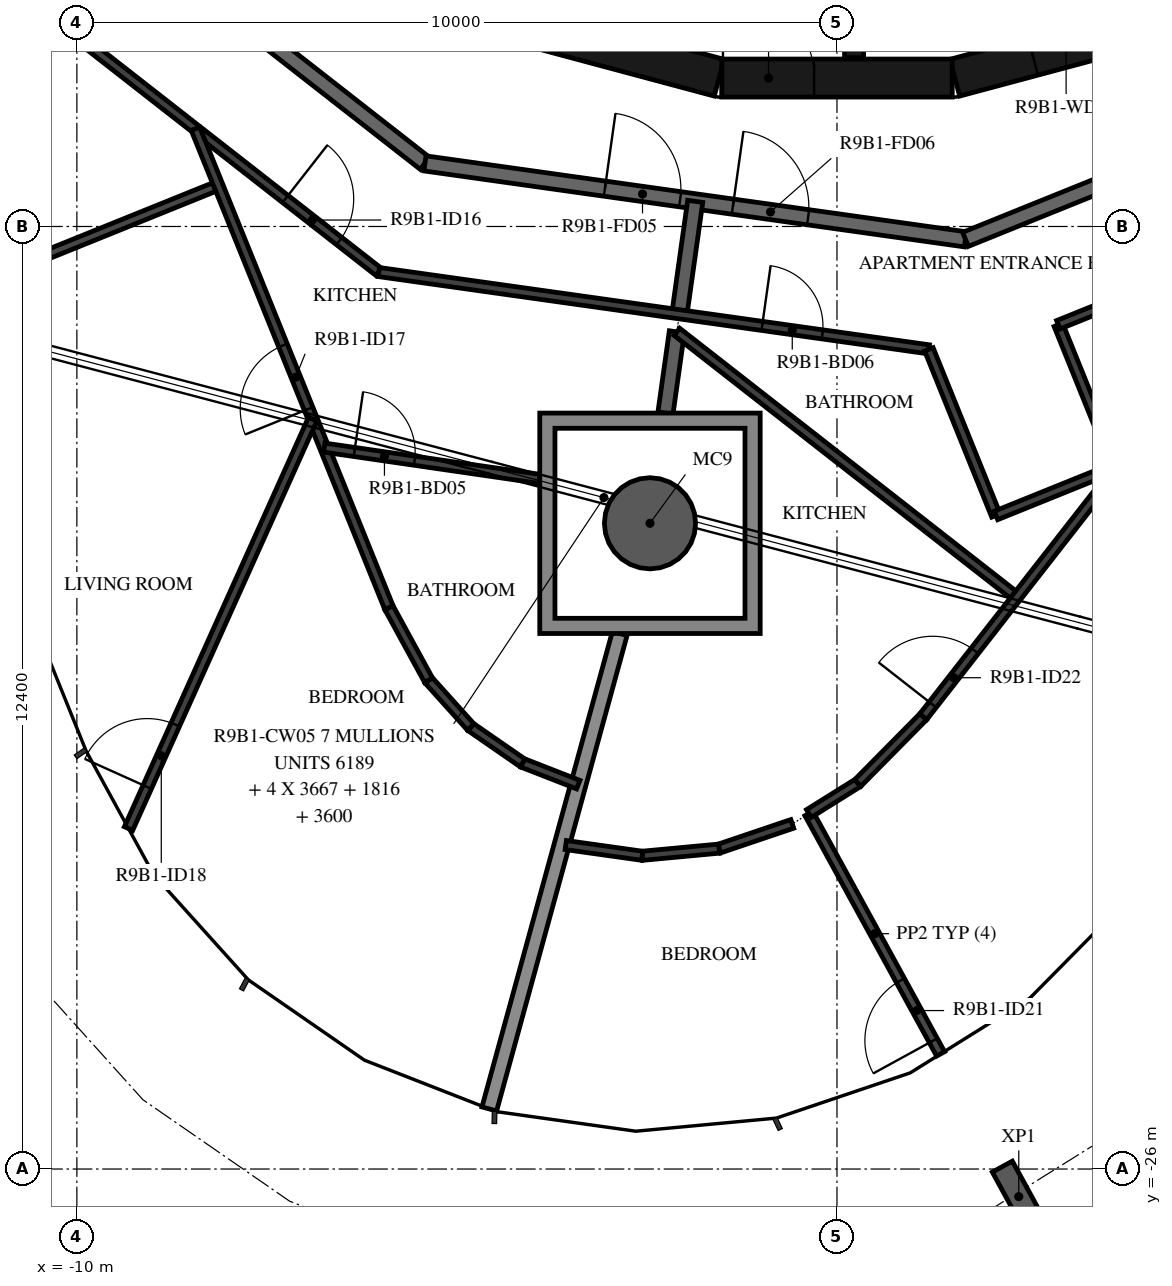
"""IFC4 building model, lengths in metres.
Left out: names, types, materials, properties, quantities, classifications, styles, units other than length and angle.
Written with IfcOpenShell. Run it as: python <this file> out.ifc"""

import sys

from ifc_helpers import new_model, si_unit, direction, frame, frame_2d, origin, origin_2d, place, context, subcontext, project, spatial, polyline, rectangle, hollow_circle, i_section, outline, extrude, element, fill, save


model = new_model("IFC4")
c1 = context("Model", 3, precision=1e-05, world=origin(), true_north=direction((0.0, 1.0)))
c2 = subcontext(c1, "Body", "Model", "MODEL_VIEW")
j1 = project(units=[si_unit("LENGTHUNIT", "METRE"), si_unit("PLANEANGLEUNIT", "RADIAN")], contexts=[c1])
p1 = place(None, origin())
s1 = spatial("IfcSite", under=j1, at=p1, CompositionType="ELEMENT")
p2 = place(p1, origin())
s2 = spatial("IfcBuilding", under=s1, at=p2, CompositionType="ELEMENT")
p3 = place(p2, frame((0.0, 0.0, 343.5)))
s3 = spatial("IfcBuildingStorey", under=s2, at=p3, CompositionType="ELEMENT", Elevation=343.5)
p4 = place(p3, frame((-2.46, -17.505, -0.38), z_axis=(0.0, 0.0, 1.0), x_axis=(1.0, 0.0, 0.0)))
e1 = element("IfcColumn", 1, at=p4, inside=s3, PredefinedType="COLUMN", context=c2, shape_type="SweptSolid", body=[
    extrude(hollow_circle(Radius=0.6, WallThickness=0.03, at=origin_2d()), origin(), (0.0, 0.0, 1.0), 3.5),
])
p5 = place(p3, frame((2.392, -26.363, -0.38), z_axis=(0.0, 0.0, 1.0), x_axis=(-0.877055410309, -0.480389224741, 0.0)))
e2 = element("IfcColumn", 2, at=p5, inside=s3, PredefinedType="COLUMN", context=c2, shape_type="SweptSolid", body=[
    extrude(i_section(OverallWidth=0.3, OverallDepth=0.9, WebThickness=0.019, FlangeThickness=0.035, FilletRadius=0.03, at=origin_2d()), origin(), (0.0, 0.0, 1.0), 3.5),
])
p6 = place(p3, frame((1.55, -11.643, 0.0), z_axis=(0.0, 0.0, 1.0), x_axis=(0.965948410781, 0.258734743916, 0.0)))
e3 = element("IfcWall", 3, at=p6, inside=s3, PredefinedType="SHEAR", context=c2, shape_type="SweptSolid", body=[
    extrude(rectangle(XDim=3.033, YDim=0.5, at=frame_2d((1.516, 0.0))), origin(), (0.0, 0.0, 1.0), 3.12),
])
p7 = place(p6, frame((1.066, 0.0, 0.0)))
e4 = element("IfcOpeningElement", 4, at=p7, cuts=e3, PredefinedType="OPENING", context=c2, shape_type="SweptSolid", body=[
    extrude(rectangle(XDim=0.9, YDim=2.1, at=frame_2d((0.45, 1.05))), frame((0.0, 0.26, 0.0), z_axis=(0.0, -1.0, 0.0), x_axis=(1.0, 0.0, 0.0)), (0.0, 0.0, 1.0), 0.52),
])
p8 = place(p3, frame((-4.479, -10.858, 0.0), z_axis=(0.0, 0.0, 1.0), x_axis=(0.965948410781, -0.258734743916, 0.0)))
e5 = element("IfcWall", 5, at=p8, inside=s3, PredefinedType="SHEAR", context=c2, shape_type="SweptSolid", body=[
    extrude(rectangle(XDim=3.033, YDim=0.5, at=frame_2d((1.516, 0.0))), origin(), (0.0, 0.0, 1.0), 3.12),
])
p9 = place(p3, frame((-1.516, -11.647, 0.0), z_axis=(0.0, 0.0, 1.0), x_axis=(1.0, 0.0, 0.0)))
e6 = element("IfcWall", 6, at=p9, inside=s3, PredefinedType="SHEAR", context=c2, shape_type="SweptSolid", body=[
    extrude(rectangle(XDim=3.033, YDim=0.5, at=frame_2d((1.516, 0.0))), origin(), (0.0, 0.0, 1.0), 3.12),
])
p10 = place(p9, frame((0.016, 0.0, 0.0)))
e7 = element("IfcOpeningElement", 7, at=p10, cuts=e6, PredefinedType="OPENING", context=c2, shape_type="SweptSolid", body=[
    extrude(rectangle(XDim=1.2, YDim=2.1, at=frame_2d((0.6, 1.05))), frame((0.0, 0.26, 0.0), z_axis=(0.0, -1.0, 0.0), x_axis=(1.0, 0.0, 0.0)), (0.0, 0.0, 1.0), 0.52),
])
p11 = place(p3, frame((0.225, -8.97, 0.0), z_axis=(0.0, 0.0, 1.0), x_axis=(0.0, -1.0, 0.0)))
e8 = element("IfcWall", 8, at=p11, inside=s3, PredefinedType="SHEAR", context=c2, shape_type="SweptSolid", body=[
    extrude(rectangle(XDim=2.41, YDim=0.25, at=frame_2d((1.205, 0.0))), origin(), (0.0, 0.0, 1.0), 3.12),
])
p12 = place(p3, frame((-11.079, -8.349, 0.0), z_axis=(0.0, 0.0, 1.0), x_axis=(0.78800478687, -0.615669112324, 0.0)))
e9 = element("IfcWall", 9, at=p12, inside=s3, PredefinedType="STANDARD", context=c2, shape_type="SweptSolid", body=[
    extrude(rectangle(XDim=7.181, YDim=0.2, at=frame_2d((3.591, 0.0))), origin(), (0.0, 0.0, 1.0), 3.12),
])
p13 = place(p3, frame((-5.42, -12.77, 0.0), z_axis=(0.0, 0.0, 1.0), x_axis=(0.990270565508, -0.139155334385, 0.0)))
e10 = element("IfcWall", 10, at=p13, inside=s3, PredefinedType="STANDARD", context=c2, shape_type="SweptSolid", body=[
    extrude(rectangle(XDim=7.181, YDim=0.2, at=frame_2d((3.59, 0.0))), origin(), (0.0, 0.0, 1.0), 3.12),
])
p14 = place(p13, frame((2.39, 0.0, 0.0)))
e11 = element("IfcOpeningElement", 11, at=p14, cuts=e10, PredefinedType="OPENING", context=c2, shape_type="SweptSolid", body=[
    extrude(rectangle(XDim=1.0, YDim=2.1, at=frame_2d((0.5, 1.05))), frame((0.0, 0.11, 0.0), z_axis=(0.0, -1.0, 0.0), x_axis=(1.0, 0.0, 0.0)), (0.0, 0.0, 1.0), 0.22),
])
p15 = place(p13, frame((4.091, 0.0, 0.0)))
e12 = element("IfcOpeningElement", 12, at=p15, cuts=e10, PredefinedType="OPENING", context=c2, shape_type="SweptSolid", body=[
    extrude(rectangle(XDim=1.0, YDim=2.1, at=frame_2d((0.5, 1.05))), frame((0.0, 0.11, 0.0), z_axis=(0.0, -1.0, 0.0), x_axis=(1.0, 0.0, 0.0)), (0.0, 0.0, 1.0), 0.22),
])
p16 = place(p3, frame((1.691, -13.769, 0.0), z_axis=(0.0, 0.0, 1.0), x_axis=(0.92717916932, 0.374618189599, 0.0)))
e13 = element("IfcWall", 13, at=p16, inside=s3, PredefinedType="STANDARD", context=c2, shape_type="SweptSolid", body=[
    extrude(rectangle(XDim=7.181, YDim=0.2, at=frame_2d((3.591, 0.0))), origin(), (0.0, 0.0, 1.0), 3.12),
])
p17 = place(p3, frame((-2.073, -14.755, 0.0), z_axis=(0.0, 0.0, 1.0), x_axis=(0.139005431033, 0.990291618738, 0.0)))
e14 = element("IfcWall", 14, at=p17, inside=s3, PredefinedType="STANDARD", context=c2, shape_type="SweptSolid", body=[
    extrude(rectangle(XDim=1.5, YDim=0.2, at=frame_2d((0.75, 0.0))), origin(), (0.0, 0.0, 1.0), 3.12),
])
p18 = place(p3, frame((-2.256, -16.055, 0.0), z_axis=(0.0, 0.0, 1.0), x_axis=(0.139109268657, 0.990277037689, 0.0)))
e15 = element("IfcWall", 15, at=p18, inside=s3, PredefinedType="STANDARD", context=c2, shape_type="SweptSolid", body=[
    extrude(rectangle(XDim=1.079, YDim=0.2, at=frame_2d((0.54, 0.0))), origin(), (0.0, 0.0, 1.0), 3.12),
])
p19 = place(p3, frame((-4.574, -25.21, 0.0), z_axis=(0.0, 0.0, 1.0), x_axis=(0.264579024648, 0.964364007892, 0.0)))
e16 = element("IfcWall", 16, at=p19, inside=s3, PredefinedType="STANDARD", context=c2, shape_type="SweptSolid", body=[
    extrude(rectangle(XDim=6.486, YDim=0.2, at=frame_2d((3.243, 0.0))), origin(), (0.0, 0.0, 1.0), 2.73),
])
p20 = place(p3, frame((-12.319, -9.283, 0.0), z_axis=(0.0, 0.0, 1.0), x_axis=(0.788000268464, -0.61567489546, 0.0)))
e17 = element("IfcWall", 17, at=p20, inside=s3, PredefinedType="PARTITIONING", context=c2, shape_type="SweptSolid", body=[
    extrude(rectangle(XDim=7.985, YDim=0.12, at=frame_2d((3.992, 0.0))), origin(), (0.0, 0.0, 1.0), 3.12),
])
p21 = place(p20, frame((6.423, 0.0, 0.0)))
e18 = element("IfcOpeningElement", 18, at=p21, cuts=e17, PredefinedType="OPENING", context=c2, shape_type="SweptSolid", body=[
    extrude(rectangle(XDim=0.9, YDim=2.1, at=frame_2d((0.45, 1.05))), frame((0.0, 0.07, 0.0), z_axis=(0.0, -1.0, 0.0), x_axis=(1.0, 0.0, 0.0)), (0.0, 0.0, 1.0), 0.14),
])
p22 = place(p3, frame((-6.027, -14.199, 0.0), z_axis=(0.0, 0.0, 1.0), x_axis=(0.990271617837, -0.139147845494, 0.0)))
e19 = element("IfcWall", 19, at=p22, inside=s3, PredefinedType="PARTITIONING", context=c2, shape_type="SweptSolid", body=[
    extrude(rectangle(XDim=7.308, YDim=0.12, at=frame_2d((3.654, 0.0))), origin(), (0.0, 0.0, 1.0), 3.12),
])
p23 = place(p22, frame((5.093, 0.0, 0.0)))
e20 = element("IfcOpeningElement", 20, at=p23, cuts=e19, PredefinedType="OPENING", context=c2, shape_type="SweptSolid", body=[
    extrude(rectangle(XDim=0.8, YDim=2.1, at=frame_2d((0.4, 1.05))), frame((0.0, 0.07, 0.0), z_axis=(0.0, -1.0, 0.0), x_axis=(1.0, 0.0, 0.0)), (0.0, 0.0, 1.0), 0.14),
])
p24 = place(p3, frame((-12.219, -14.708, 0.0), z_axis=(0.0, 0.0, 1.0), x_axis=(0.927189216671, 0.374593321469, 0.0)))
e21 = element("IfcWall", 21, at=p24, inside=s3, PredefinedType="PARTITIONING", context=c2, shape_type="SweptSolid", body=[
    extrude(rectangle(XDim=4.4, YDim=0.12, at=frame_2d((2.2, 0.0))), origin(), (0.0, 0.0, 1.0), 2.73),
])
p25 = place(p3, frame((-5.894, -18.616, 0.0), z_axis=(0.0, 0.0, 1.0), x_axis=(-0.374596683143, 0.927187858515, 0.0)))
e22 = element("IfcWall", 22, at=p25, inside=s3, PredefinedType="PARTITIONING", context=c2, shape_type="SweptSolid", body=[
    extrude(rectangle(XDim=6.796, YDim=0.12, at=frame_2d((3.398, 0.0))), origin(), (0.0, 0.0, 1.0), 3.12),
])
p26 = place(p25, frame((2.822, 0.0, 0.0)))
e23 = element("IfcOpeningElement", 23, at=p26, cuts=e22, PredefinedType="OPENING", context=c2, shape_type="SweptSolid", body=[
    extrude(rectangle(XDim=0.9, YDim=2.1, at=frame_2d((0.45, 1.05))), frame((0.0, 0.07, 0.0), z_axis=(0.0, -1.0, 0.0), x_axis=(1.0, 0.0, 0.0)), (0.0, 0.0, 1.0), 0.14),
])
p27 = place(p3, frame((-9.32, -21.521, 0.0), z_axis=(0.0, 0.0, 1.0), x_axis=(0.410206582363, 0.911992631432, 0.0)))
e24 = element("IfcWall", 24, at=p27, inside=s3, PredefinedType="PARTITIONING", context=c2, shape_type="SweptSolid", body=[
    extrude(rectangle(XDim=5.908, YDim=0.12, at=frame_2d((2.954, 0.0))), origin(), (0.0, 0.0, 1.0), 3.12),
])
p28 = place(p27, frame((0.6, 0.0, 0.0)))
e25 = element("IfcOpeningElement", 25, at=p28, cuts=e24, PredefinedType="OPENING", context=c2, shape_type="SweptSolid", body=[
    extrude(rectangle(XDim=0.9, YDim=2.1, at=frame_2d((0.45, 1.05))), frame((0.0, 0.07, 0.0), z_axis=(0.0, -1.0, 0.0), x_axis=(1.0, 0.0, 0.0)), (0.0, 0.0, 1.0), 0.14),
])
p29 = place(p3, frame((-6.745, -16.509, 0.0), z_axis=(0.0, 0.0, 1.0), x_axis=(0.989610924185, -0.143771411393, 0.0)))
e26 = element("IfcWall", 26, at=p29, inside=s3, PredefinedType="PARTITIONING", context=c2, shape_type="SweptSolid", body=[
    extrude(rectangle(XDim=2.865, YDim=0.12, at=frame_2d((1.432, 0.0))), origin(), (0.0, 0.0, 1.0), 3.12),
])
p30 = place(p29, frame((0.4, 0.0, 0.0)))
e27 = element("IfcOpeningElement", 27, at=p30, cuts=e26, PredefinedType="OPENING", context=c2, shape_type="SweptSolid", body=[
    extrude(rectangle(XDim=0.8, YDim=2.1, at=frame_2d((0.4, 1.05))), frame((0.0, 0.07, 0.0), z_axis=(0.0, -1.0, 0.0), x_axis=(1.0, 0.0, 0.0)), (0.0, 0.0, 1.0), 0.14),
])
p31 = place(p3, frame((-3.404, -20.943, 0.0), z_axis=(0.0, 0.0, 1.0), x_axis=(-0.931485289212, 0.363778993321, 0.0)))
e28 = element("IfcWall", 28, at=p31, inside=s3, PredefinedType="PARTITIONING", context=c2, shape_type="SweptSolid", body=[
    extrude(rectangle(XDim=0.787, YDim=0.12, at=frame_2d((0.393, 0.0))), origin(), (0.0, 0.0, 1.0), 3.12),
])
p32 = place(p3, frame((-4.136, -20.657, 0.0), z_axis=(0.0, 0.0, 1.0), x_axis=(-0.822552500908, 0.568689179826, 0.0)))
e29 = element("IfcWall", 29, at=p32, inside=s3, PredefinedType="PARTITIONING", context=c2, shape_type="SweptSolid", body=[
    extrude(rectangle(XDim=0.829, YDim=0.12, at=frame_2d((0.415, 0.0))), origin(), (0.0, 0.0, 1.0), 3.12),
])
p33 = place(p3, frame((-4.818, -20.186, 0.0), z_axis=(0.0, 0.0, 1.0), x_axis=(-0.669013557227, 0.743250200301, 0.0)))
e30 = element("IfcWall", 30, at=p33, inside=s3, PredefinedType="PARTITIONING", context=c2, shape_type="SweptSolid", body=[
    extrude(rectangle(XDim=0.829, YDim=0.12, at=frame_2d((0.415, 0.0))), origin(), (0.0, 0.0, 1.0), 3.12),
])
p34 = place(p3, frame((-5.373, -19.57, 0.0), z_axis=(0.0, 0.0, 1.0), x_axis=(-0.479796131471, 0.87738000446, 0.0)))
e31 = element("IfcWall", 31, at=p34, inside=s3, PredefinedType="PARTITIONING", context=c2, shape_type="SweptSolid", body=[
    extrude(rectangle(XDim=1.087, YDim=0.12, at=frame_2d((0.543, 0.0))), origin(), (0.0, 0.0, 1.0), 3.12),
])
p35 = place(p3, frame((1.209, -15.216, 0.0), z_axis=(0.0, 0.0, 1.0), x_axis=(0.374531550488, -0.927214170345, 0.0)))
e32 = element("IfcWall", 32, at=p35, inside=s3, PredefinedType="PARTITIONING", context=c2, shape_type="SweptSolid", body=[
    extrude(rectangle(XDim=2.357, YDim=0.12, at=frame_2d((1.179, 0.0))), origin(), (0.0, 0.0, 1.0), 3.12),
])
p36 = place(p3, frame((2.092, -17.402, 0.0), z_axis=(0.0, 0.0, 1.0), x_axis=(0.927153589835, 0.374681492546, 0.0)))
e33 = element("IfcWall", 33, at=p36, inside=s3, PredefinedType="PARTITIONING", context=c2, shape_type="SweptSolid", body=[
    extrude(rectangle(XDim=1.7, YDim=0.12, at=frame_2d((0.85, 0.0))), origin(), (0.0, 0.0, 1.0), 3.12),
])
p37 = place(p3, frame((3.668, -16.765, 0.0), z_axis=(0.0, 0.0, 1.0), x_axis=(-0.374621045498, 0.927178015416, 0.0)))
e34 = element("IfcWall", 34, at=p37, inside=s3, PredefinedType="PARTITIONING", context=c2, shape_type="SweptSolid", body=[
    extrude(rectangle(XDim=2.018, YDim=0.12, at=frame_2d((1.009, 0.0))), origin(), (0.0, 0.0, 1.0), 3.12),
])
p38 = place(p3, frame((2.912, -14.894, 0.0), z_axis=(0.0, 0.0, 1.0), x_axis=(0.927182280165, 0.374610490174, 0.0)))
e35 = element("IfcWall", 35, at=p38, inside=s3, PredefinedType="PARTITIONING", context=c2, shape_type="SweptSolid", body=[
    extrude(rectangle(XDim=6.872, YDim=0.12, at=frame_2d((3.436, 0.0))), origin(), (0.0, 0.0, 1.0), 3.12),
])
p39 = place(p38, frame((3.748, 0.0, 0.0)))
e36 = element("IfcOpeningElement", 36, at=p39, cuts=e35, PredefinedType="OPENING", context=c2, shape_type="SweptSolid", body=[
    extrude(rectangle(XDim=0.9, YDim=2.1, at=frame_2d((0.45, 1.05))), frame((0.0, 0.07, 0.0), z_axis=(0.0, -1.0, 0.0), x_axis=(1.0, 0.0, 0.0)), (0.0, 0.0, 1.0), 0.14),
])
p40 = place(p3, frame((-0.588, -21.459, 0.0), z_axis=(0.0, 0.0, 1.0), x_axis=(-0.94737753159, -0.320118435332, 0.0)))
e37 = element("IfcWall", 37, at=p40, inside=s3, PredefinedType="PARTITIONING", context=c2, shape_type="SweptSolid", body=[
    extrude(rectangle(XDim=1.016, YDim=0.12, at=frame_2d((0.508, 0.0))), origin(), (0.0, 0.0, 1.0), 3.12),
])
p41 = place(p3, frame((-1.55, -21.785, 0.0), z_axis=(0.0, 0.0, 1.0), x_axis=(-0.995667655176, -0.092983441736, 0.0)))
e38 = element("IfcWall", 38, at=p41, inside=s3, PredefinedType="PARTITIONING", context=c2, shape_type="SweptSolid", body=[
    extrude(rectangle(XDim=1.016, YDim=0.12, at=frame_2d((0.508, 0.0))), origin(), (0.0, 0.0, 1.0), 3.12),
])
p42 = place(p3, frame((-2.562, -21.879, 0.0), z_axis=(0.0, 0.0, 1.0), x_axis=(-0.990273657549, 0.139133328736, 0.0)))
e39 = element("IfcWall", 39, at=p42, inside=s3, PredefinedType="PARTITIONING", context=c2, shape_type="SweptSolid", body=[
    extrude(rectangle(XDim=1.016, YDim=0.12, at=frame_2d((0.508, 0.0))), origin(), (0.0, 0.0, 1.0), 3.12),
])
p43 = place(p3, frame((1.363, -24.485, 0.0), z_axis=(0.0, 0.0, 1.0), x_axis=(-0.480374148719, 0.877063667725, 0.0)))
e40 = element("IfcWall", 40, at=p43, inside=s3, PredefinedType="PARTITIONING", context=c2, shape_type="SweptSolid", body=[
    extrude(rectangle(XDim=3.606, YDim=0.12, at=frame_2d((1.803, 0.0))), origin(), (0.0, 0.0, 1.0), 2.73),
])
p44 = place(p43, frame((0.2, 0.0, 0.0)))
e41 = element("IfcOpeningElement", 41, at=p44, cuts=e40, PredefinedType="OPENING", context=c2, shape_type="SweptSolid", body=[
    extrude(rectangle(XDim=0.9, YDim=2.1, at=frame_2d((0.45, 1.05))), frame((0.0, 0.07, 0.0), z_axis=(0.0, -1.0, 0.0), x_axis=(1.0, 0.0, 0.0)), (0.0, 0.0, 1.0), 0.14),
])
p45 = place(p3, frame((2.363, -18.478, 0.0), z_axis=(0.0, 0.0, 1.0), x_axis=(-0.788010669333, 0.615661583191, 0.0)))
e42 = element("IfcWall", 42, at=p45, inside=s3, PredefinedType="PARTITIONING", context=c2, shape_type="SweptSolid", body=[
    extrude(rectangle(XDim=5.672, YDim=0.12, at=frame_2d((2.836, 0.0))), origin(), (0.0, 0.0, 1.0), 3.12),
])
p46 = place(p3, frame((-0.369, -21.323, 0.0), z_axis=(0.0, 0.0, 1.0), x_axis=(0.847998304005, 0.529998940003, 0.0)))
e43 = element("IfcWall", 43, at=p46, inside=s3, PredefinedType="PARTITIONING", context=c2, shape_type="SweptSolid", body=[
    extrude(rectangle(XDim=0.758, YDim=0.12, at=frame_2d((0.379, 0.0))), origin(), (0.0, 0.0, 1.0), 3.12),
])
p47 = place(p3, frame((0.274, -20.921, 0.0), z_axis=(0.0, 0.0, 1.0), x_axis=(0.702915150142, 0.711273710818, 0.0)))
e44 = element("IfcWall", 44, at=p47, inside=s3, PredefinedType="PARTITIONING", context=c2, shape_type="SweptSolid", body=[
    extrude(rectangle(XDim=1.227, YDim=0.12, at=frame_2d((0.613, 0.0))), origin(), (0.0, 0.0, 1.0), 3.12),
])
p48 = place(p3, frame((1.136, -20.049, 0.0), z_axis=(0.0, 0.0, 1.0), x_axis=(0.615662465763, 0.788009979792, 0.0)))
e45 = element("IfcWall", 45, at=p48, inside=s3, PredefinedType="PARTITIONING", context=c2, shape_type="SweptSolid", body=[
    extrude(rectangle(XDim=8.229, YDim=0.12, at=frame_2d((4.114, 0.0))), origin(), (0.0, 0.0, 1.0), 3.12),
])
p49 = place(p48, frame((0.2, 0.0, 0.0)))
e46 = element("IfcOpeningElement", 46, at=p49, cuts=e45, PredefinedType="OPENING", context=c2, shape_type="SweptSolid", body=[
    extrude(rectangle(XDim=0.9, YDim=2.1, at=frame_2d((0.45, 1.05))), frame((0.0, 0.07, 0.0), z_axis=(0.0, -1.0, 0.0), x_axis=(1.0, 0.0, 0.0)), (0.0, 0.0, 1.0), 0.14),
])
p50 = place(p3, origin())
e47 = element("IfcWall", 47, at=p50, inside=s3, PredefinedType="STANDARD", context=c2, shape_type="SweptSolid", body=[
    extrude(outline(polyline([(-1.01, -16.055), (-1.01, -18.955), (-3.91, -18.955), (-3.91, -16.055), (-1.01, -16.055)]), holes=[polyline([(-3.71, -18.755), (-1.21, -18.755), (-1.21, -16.255), (-3.71, -16.255), (-3.71, -18.755)])]), origin(), (0.0, 0.0, 1.0), 3.12),
])
p51 = place(p10, origin())
e48 = element("IfcDoor", 48, at=p51, inside=s3, OperationType="SINGLE_SWING_RIGHT", PredefinedType="DOOR", context=c2, shape_type="SweptSolid", body=[
    extrude(rectangle(XDim=1.2, YDim=2.1, at=frame_2d((0.6, 1.05))), frame((0.0, 0.025, 0.0), z_axis=(0.0, -1.0, 0.0), x_axis=(1.0, 0.0, 0.0)), (0.0, 0.0, 1.0), 0.05),
])
fill(e7, e48)
p52 = place(p7, origin())
e49 = element("IfcDoor", 49, at=p52, inside=s3, OperationType="SINGLE_SWING_RIGHT", PredefinedType="DOOR", context=c2, shape_type="SweptSolid", body=[
    extrude(rectangle(XDim=0.9, YDim=2.1, at=frame_2d((0.45, 1.05))), frame((0.0, 0.025, 0.0), z_axis=(0.0, -1.0, 0.0), x_axis=(1.0, 0.0, 0.0)), (0.0, 0.0, 1.0), 0.05),
])
fill(e4, e49)
p53 = place(p14, origin())
e50 = element("IfcDoor", 50, at=p53, inside=s3, OperationType="SINGLE_SWING_RIGHT", PredefinedType="DOOR", context=c2, shape_type="SweptSolid", body=[
    extrude(rectangle(XDim=1.0, YDim=2.1, at=frame_2d((0.5, 1.05))), frame((0.0, 0.025, 0.0), z_axis=(0.0, -1.0, 0.0), x_axis=(1.0, 0.0, 0.0)), (0.0, 0.0, 1.0), 0.05),
])
fill(e11, e50)
p54 = place(p21, origin())
e51 = element("IfcDoor", 51, at=p54, inside=s3, OperationType="SINGLE_SWING_RIGHT", PredefinedType="DOOR", context=c2, shape_type="SweptSolid", body=[
    extrude(rectangle(XDim=0.9, YDim=2.1, at=frame_2d((0.45, 1.05))), frame((0.0, 0.025, 0.0), z_axis=(0.0, -1.0, 0.0), x_axis=(1.0, 0.0, 0.0)), (0.0, 0.0, 1.0), 0.05),
])
fill(e18, e51)
p55 = place(p26, origin())
e52 = element("IfcDoor", 52, at=p55, inside=s3, OperationType="SINGLE_SWING_RIGHT", PredefinedType="DOOR", context=c2, shape_type="SweptSolid", body=[
    extrude(rectangle(XDim=0.9, YDim=2.1, at=frame_2d((0.45, 1.05))), frame((0.0, 0.025, 0.0), z_axis=(0.0, -1.0, 0.0), x_axis=(1.0, 0.0, 0.0)), (0.0, 0.0, 1.0), 0.05),
])
fill(e23, e52)
p56 = place(p28, origin())
e53 = element("IfcDoor", 53, at=p56, inside=s3, OperationType="SINGLE_SWING_RIGHT", PredefinedType="DOOR", context=c2, shape_type="SweptSolid", body=[
    extrude(rectangle(XDim=0.9, YDim=2.1, at=frame_2d((0.45, 1.05))), frame((0.0, 0.025, 0.0), z_axis=(0.0, -1.0, 0.0), x_axis=(1.0, 0.0, 0.0)), (0.0, 0.0, 1.0), 0.05),
])
fill(e25, e53)
p57 = place(p30, origin())
e54 = element("IfcDoor", 54, at=p57, inside=s3, OperationType="SINGLE_SWING_RIGHT", PredefinedType="DOOR", context=c2, shape_type="SweptSolid", body=[
    extrude(rectangle(XDim=0.8, YDim=2.1, at=frame_2d((0.4, 1.05))), frame((0.0, 0.025, 0.0), z_axis=(0.0, -1.0, 0.0), x_axis=(1.0, 0.0, 0.0)), (0.0, 0.0, 1.0), 0.05),
])
fill(e27, e54)
p58 = place(p15, origin())
e55 = element("IfcDoor", 55, at=p58, inside=s3, OperationType="SINGLE_SWING_RIGHT", PredefinedType="DOOR", context=c2, shape_type="SweptSolid", body=[
    extrude(rectangle(XDim=1.0, YDim=2.1, at=frame_2d((0.5, 1.05))), frame((0.0, 0.025, 0.0), z_axis=(0.0, -1.0, 0.0), x_axis=(1.0, 0.0, 0.0)), (0.0, 0.0, 1.0), 0.05),
])
fill(e12, e55)
p59 = place(p23, origin())
e56 = element("IfcDoor", 56, at=p59, inside=s3, OperationType="SINGLE_SWING_LEFT", PredefinedType="DOOR", context=c2, shape_type="SweptSolid", body=[
    extrude(rectangle(XDim=0.8, YDim=2.1, at=frame_2d((0.4, 1.05))), frame((0.0, 0.025, 0.0), z_axis=(0.0, -1.0, 0.0), x_axis=(1.0, 0.0, 0.0)), (0.0, 0.0, 1.0), 0.05),
])
fill(e20, e56)
p60 = place(p44, origin())
e57 = element("IfcDoor", 57, at=p60, inside=s3, OperationType="SINGLE_SWING_LEFT", PredefinedType="DOOR", context=c2, shape_type="SweptSolid", body=[
    extrude(rectangle(XDim=0.9, YDim=2.1, at=frame_2d((0.45, 1.05))), frame((0.0, 0.025, 0.0), z_axis=(0.0, -1.0, 0.0), x_axis=(1.0, 0.0, 0.0)), (0.0, 0.0, 1.0), 0.05),
])
fill(e41, e57)
p61 = place(p49, origin())
e58 = element("IfcDoor", 58, at=p61, inside=s3, OperationType="SINGLE_SWING_RIGHT", PredefinedType="DOOR", context=c2, shape_type="SweptSolid", body=[
    extrude(rectangle(XDim=0.9, YDim=2.1, at=frame_2d((0.45, 1.05))), frame((0.0, 0.025, 0.0), z_axis=(0.0, -1.0, 0.0), x_axis=(1.0, 0.0, 0.0)), (0.0, 0.0, 1.0), 0.05),
])
fill(e46, e58)
save(model, sys.argv[1])
